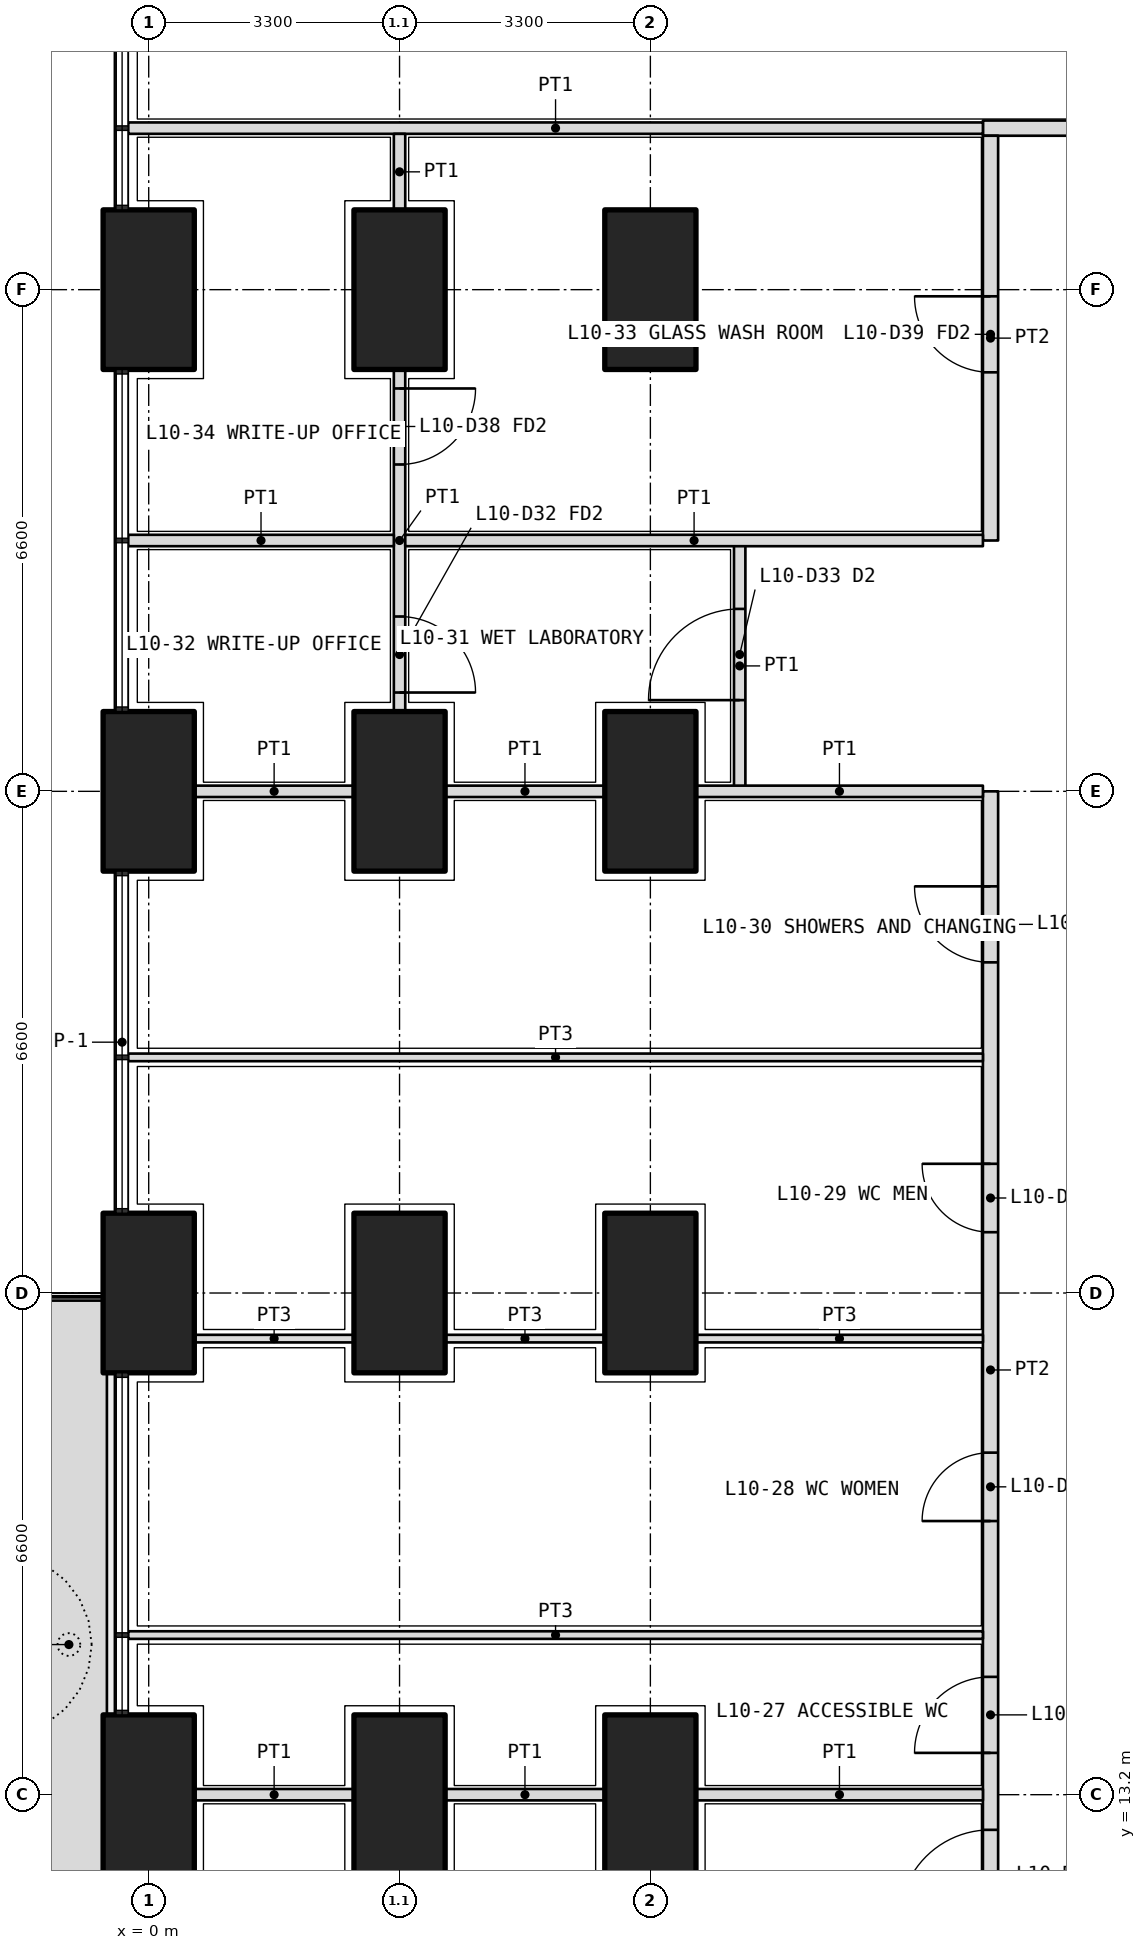
"""IFC4 building model, lengths in metres.
Left out: names, types, materials, properties, quantities, classifications, styles, units other than length and angle.
Written with IfcOpenShell. Run it as: python <this file> out.ifc"""

import sys

from ifc_helpers import new_model, si_unit, direction, frame, frame_2d, origin, origin_2d, place, context, subcontext, project, spatial, polyline, rectangle, outline, extrude, element, fill, save


model = new_model("IFC4")
c1 = context("Model", 3, precision=1e-05, world=origin(), true_north=direction((0.0, 1.0)))
c2 = subcontext(c1, "Body", "Model", "MODEL_VIEW")
j1 = project(units=[si_unit("LENGTHUNIT", "METRE"), si_unit("PLANEANGLEUNIT", "RADIAN")], contexts=[c1])
p1 = place(None, origin())
s1 = spatial("IfcSite", under=j1, at=p1, CompositionType="ELEMENT")
p2 = place(p1, origin())
s2 = spatial("IfcBuilding", under=s1, at=p2, CompositionType="ELEMENT")
p3 = place(p2, frame((0.0, 0.0, 46.5)))
s3 = spatial("IfcBuildingStorey", under=s2, at=p3, CompositionType="ELEMENT", Elevation=46.5)
for number, where, z_axis, x_axis in (
    (1, (0.0, 13.2, 0.0), (0.0, 0.0, 1.0), (0.0, 1.0, 0.0)),
    (2, (0.0, 19.8, 0.0), (0.0, 0.0, 1.0), (0.0, 1.0, 0.0)),
    (3, (0.0, 26.4, 0.0), (0.0, 0.0, 1.0), (0.0, 1.0, 0.0)),
    (4, (0.0, 33.0, 0.0), (0.0, 0.0, 1.0), (0.0, 1.0, 0.0)),
    (5, (3.3, 13.2, 0.0), (0.0, 0.0, 1.0), (0.0, 1.0, 0.0)),
    (6, (3.3, 19.8, 0.0), (0.0, 0.0, 1.0), (0.0, 1.0, 0.0)),
    (7, (3.3, 26.4, 0.0), (0.0, 0.0, 1.0), (0.0, 1.0, 0.0)),
    (8, (3.3, 33.0, 0.0), (0.0, 0.0, 1.0), (0.0, 1.0, 0.0)),
    (9, (6.6, 13.2, 0.0), (0.0, 0.0, 1.0), (0.0, 1.0, 0.0)),
    (10, (6.6, 19.8, 0.0), (0.0, 0.0, 1.0), (0.0, 1.0, 0.0)),
    (11, (6.6, 26.4, 0.0), (0.0, 0.0, 1.0), (0.0, 1.0, 0.0)),
    (12, (6.6, 33.0, 0.0), (0.0, 0.0, 1.0), (0.0, 1.0, 0.0)),
):
    element("IfcColumn", number, at=place(p3, frame(where, z_axis=z_axis, x_axis=x_axis)), inside=s3, PredefinedType="COLUMN", context=c2, shape_type="SweptSolid", body=[
        extrude(rectangle(XDim=2.1, YDim=1.2, at=origin_2d()), origin(), (0.0, 0.0, 1.0), 4.2),
    ])
p4 = place(p3, origin())
e13 = element("IfcWall", 13, at=p4, inside=s3, PredefinedType="USERDEFINED", context=c2, shape_type="SweptSolid", body=[
    extrude(outline(polyline([(-1.55, 10.65), (-0.55, 10.65), (-0.55, 19.7), (-1.55, 19.7), (-1.55, 10.65)]), holes=[polyline([(-1.4, 10.8), (-0.7, 10.8), (-0.7, 19.55), (-1.4, 19.55), (-1.4, 10.8)])]), origin(), (0.0, 0.0, 1.0), 1.05),
])
p5 = place(p3, frame((10.975, 35.125, 0.0), z_axis=(0.0, 0.0, 1.0), x_axis=(1.0, 0.0, 0.0)))
e14 = element("IfcWall", 14, at=p5, inside=s3, PredefinedType="PARTITIONING", context=c2, shape_type="SweptSolid", body=[
    extrude(rectangle(XDim=30.85, YDim=0.2, at=frame_2d((15.425, 0.0))), origin(), (0.0, 0.0, 1.0), 2.85),
])
p6 = place(p5, frame((3.962, 0.0, 0.0)))
e15 = element("IfcOpeningElement", 15, at=p6, cuts=e14, PredefinedType="OPENING", context=c2, shape_type="SweptSolid", body=[
    extrude(rectangle(XDim=1.0, YDim=2.1, at=frame_2d((0.5, 1.05))), frame((0.0, 0.11, 0.0), z_axis=(0.0, -1.0, 0.0), x_axis=(1.0, 0.0, 0.0)), (0.0, 0.0, 1.0), 0.22),
])
p7 = place(p5, frame((16.475, 0.0, 0.0)))
e16 = element("IfcOpeningElement", 16, at=p7, cuts=e14, PredefinedType="OPENING", context=c2, shape_type="SweptSolid", body=[
    extrude(rectangle(XDim=1.2, YDim=2.1, at=frame_2d((0.6, 1.05))), frame((0.0, 0.11, 0.0), z_axis=(0.0, -1.0, 0.0), x_axis=(1.0, 0.0, 0.0)), (0.0, 0.0, 1.0), 0.22),
])
p8 = place(p5, frame((27.438, 0.0, 0.0)))
e17 = element("IfcOpeningElement", 17, at=p8, cuts=e14, PredefinedType="OPENING", context=c2, shape_type="SweptSolid", body=[
    extrude(rectangle(XDim=1.2, YDim=2.1, at=frame_2d((0.6, 1.05))), frame((0.0, 0.11, 0.0), z_axis=(0.0, -1.0, 0.0), x_axis=(1.0, 0.0, 0.0)), (0.0, 0.0, 1.0), 0.22),
])
p9 = place(p3, frame((11.075, 11.175, 0.0), z_axis=(0.0, 0.0, 1.0), x_axis=(0.0, 1.0, 0.0)))
e18 = element("IfcWall", 18, at=p9, inside=s3, PredefinedType="PARTITIONING", context=c2, shape_type="SweptSolid", body=[
    extrude(rectangle(XDim=15.225, YDim=0.2, at=frame_2d((7.612, 0.0))), origin(), (0.0, 0.0, 1.0), 2.85),
])
p10 = place(p9, frame((0.363, 0.0, 0.0)))
e19 = element("IfcOpeningElement", 19, at=p10, cuts=e18, PredefinedType="OPENING", context=c2, shape_type="SweptSolid", body=[
    extrude(rectangle(XDim=1.2, YDim=2.1, at=frame_2d((0.6, 1.05))), frame((0.0, 0.11, 0.0), z_axis=(0.0, -1.0, 0.0), x_axis=(1.0, 0.0, 0.0)), (0.0, 0.0, 1.0), 0.22),
])
p11 = place(p9, frame((2.575, 0.0, 0.0)))
e20 = element("IfcOpeningElement", 20, at=p11, cuts=e18, PredefinedType="OPENING", context=c2, shape_type="SweptSolid", body=[
    extrude(rectangle(XDim=1.0, YDim=2.1, at=frame_2d((0.5, 1.05))), frame((0.0, 0.11, 0.0), z_axis=(0.0, -1.0, 0.0), x_axis=(1.0, 0.0, 0.0)), (0.0, 0.0, 1.0), 0.22),
])
p12 = place(p9, frame((5.625, 0.0, 0.0)))
e21 = element("IfcOpeningElement", 21, at=p12, cuts=e18, PredefinedType="OPENING", context=c2, shape_type="SweptSolid", body=[
    extrude(rectangle(XDim=0.9, YDim=2.1, at=frame_2d((0.45, 1.05))), frame((0.0, 0.11, 0.0), z_axis=(0.0, -1.0, 0.0), x_axis=(1.0, 0.0, 0.0)), (0.0, 0.0, 1.0), 0.22),
])
p13 = place(p9, frame((9.425, 0.0, 0.0)))
e22 = element("IfcOpeningElement", 22, at=p13, cuts=e18, PredefinedType="OPENING", context=c2, shape_type="SweptSolid", body=[
    extrude(rectangle(XDim=0.9, YDim=2.1, at=frame_2d((0.45, 1.05))), frame((0.0, 0.11, 0.0), z_axis=(0.0, -1.0, 0.0), x_axis=(1.0, 0.0, 0.0)), (0.0, 0.0, 1.0), 0.22),
])
p14 = place(p9, frame((12.975, 0.0, 0.0)))
e23 = element("IfcOpeningElement", 23, at=p14, cuts=e18, PredefinedType="OPENING", context=c2, shape_type="SweptSolid", body=[
    extrude(rectangle(XDim=1.0, YDim=2.1, at=frame_2d((0.5, 1.05))), frame((0.0, 0.11, 0.0), z_axis=(0.0, -1.0, 0.0), x_axis=(1.0, 0.0, 0.0)), (0.0, 0.0, 1.0), 0.22),
])
p15 = place(p3, frame((11.075, 29.7, 0.0), z_axis=(0.0, 0.0, 1.0), x_axis=(0.0, 1.0, 0.0)))
e24 = element("IfcWall", 24, at=p15, inside=s3, PredefinedType="PARTITIONING", context=c2, shape_type="SweptSolid", body=[
    extrude(rectangle(XDim=5.325, YDim=0.2, at=frame_2d((2.663, 0.0))), origin(), (0.0, 0.0, 1.0), 2.85),
])
p16 = place(p15, frame((2.212, 0.0, 0.0)))
e25 = element("IfcOpeningElement", 25, at=p16, cuts=e24, PredefinedType="OPENING", context=c2, shape_type="SweptSolid", body=[
    extrude(rectangle(XDim=1.0, YDim=2.1, at=frame_2d((0.5, 1.05))), frame((0.0, 0.11, 0.0), z_axis=(0.0, -1.0, 0.0), x_axis=(1.0, 0.0, 0.0)), (0.0, 0.0, 1.0), 0.22),
])
p17 = place(p3, frame((-0.27, 35.125, 0.0), z_axis=(0.0, 0.0, 1.0), x_axis=(1.0, 0.0, 0.0)))
e26 = element("IfcWall", 26, at=p17, inside=s3, PredefinedType="PARTITIONING", context=c2, shape_type="SweptSolid", body=[
    extrude(rectangle(XDim=11.245, YDim=0.15, at=frame_2d((5.623, 0.0))), origin(), (0.0, 0.0, 1.0), 2.7),
])
p18 = place(p3, frame((3.3, 35.05, 0.0), z_axis=(0.0, 0.0, 1.0), x_axis=(0.0, -1.0, 0.0)))
e27 = element("IfcWall", 27, at=p18, inside=s3, PredefinedType="PARTITIONING", context=c2, shape_type="SweptSolid", body=[
    extrude(rectangle(XDim=1.0, YDim=0.15, at=frame_2d((0.5, 0.0))), origin(), (0.0, 0.0, 1.0), 3.9),
])
p19 = place(p3, frame((3.3, 31.95, 0.0), z_axis=(0.0, 0.0, 1.0), x_axis=(0.0, -1.0, 0.0)))
e28 = element("IfcWall", 28, at=p19, inside=s3, PredefinedType="PARTITIONING", context=c2, shape_type="SweptSolid", body=[
    extrude(rectangle(XDim=4.5, YDim=0.15, at=frame_2d((2.25, 0.0))), origin(), (0.0, 0.0, 1.0), 3.9),
])
p20 = place(p19, frame((3.25, 0.0, 0.0)))
e29 = element("IfcOpeningElement", 29, at=p20, cuts=e28, PredefinedType="OPENING", context=c2, shape_type="SweptSolid", body=[
    extrude(rectangle(XDim=1.0, YDim=2.1, at=frame_2d((0.5, 1.05))), frame((0.0, 0.085, 0.0), z_axis=(0.0, -1.0, 0.0), x_axis=(1.0, 0.0, 0.0)), (0.0, 0.0, 1.0), 0.17),
])
p21 = place(p19, frame((0.25, 0.0, 0.0)))
e30 = element("IfcOpeningElement", 30, at=p21, cuts=e28, PredefinedType="OPENING", context=c2, shape_type="SweptSolid", body=[
    extrude(rectangle(XDim=1.0, YDim=2.1, at=frame_2d((0.5, 1.05))), frame((0.0, 0.085, 0.0), z_axis=(0.0, -1.0, 0.0), x_axis=(1.0, 0.0, 0.0)), (0.0, 0.0, 1.0), 0.17),
])
p22 = place(p3, frame((-0.27, 15.3, 0.0), z_axis=(0.0, 0.0, 1.0), x_axis=(1.0, 0.0, 0.0)))
e31 = element("IfcWall", 31, at=p22, inside=s3, PredefinedType="PARTITIONING", context=c2, shape_type="SweptSolid", body=[
    extrude(rectangle(XDim=11.245, YDim=0.1, at=frame_2d((5.623, 0.0))), origin(), (0.0, 0.0, 1.0), 2.7),
])
p23 = place(p3, frame((0.6, 19.2, 0.0), z_axis=(0.0, 0.0, 1.0), x_axis=(1.0, 0.0, 0.0)))
e32 = element("IfcWall", 32, at=p23, inside=s3, PredefinedType="PARTITIONING", context=c2, shape_type="SweptSolid", body=[
    extrude(rectangle(XDim=2.1, YDim=0.1, at=frame_2d((1.05, 0.0))), origin(), (0.0, 0.0, 1.0), 2.85),
])
p24 = place(p3, frame((3.9, 19.2, 0.0), z_axis=(0.0, 0.0, 1.0), x_axis=(1.0, 0.0, 0.0)))
e33 = element("IfcWall", 33, at=p24, inside=s3, PredefinedType="PARTITIONING", context=c2, shape_type="SweptSolid", body=[
    extrude(rectangle(XDim=2.1, YDim=0.1, at=frame_2d((1.05, 0.0))), origin(), (0.0, 0.0, 1.0), 2.85),
])
p25 = place(p3, frame((7.2, 19.2, 0.0), z_axis=(0.0, 0.0, 1.0), x_axis=(1.0, 0.0, 0.0)))
e34 = element("IfcWall", 34, at=p25, inside=s3, PredefinedType="PARTITIONING", context=c2, shape_type="SweptSolid", body=[
    extrude(rectangle(XDim=3.775, YDim=0.1, at=frame_2d((1.888, 0.0))), origin(), (0.0, 0.0, 1.0), 2.85),
])
p26 = place(p3, frame((-0.27, 22.9, 0.0), z_axis=(0.0, 0.0, 1.0), x_axis=(1.0, 0.0, 0.0)))
e35 = element("IfcWall", 35, at=p26, inside=s3, PredefinedType="PARTITIONING", context=c2, shape_type="SweptSolid", body=[
    extrude(rectangle(XDim=11.245, YDim=0.1, at=frame_2d((5.623, 0.0))), origin(), (0.0, 0.0, 1.0), 2.7),
])
p27 = place(p3, frame((7.775, 26.4, 0.0), z_axis=(0.0, 0.0, 1.0), x_axis=(0.0, 1.0, 0.0)))
e36 = element("IfcWall", 36, at=p27, inside=s3, PredefinedType="PARTITIONING", context=c2, shape_type="SweptSolid", body=[
    extrude(rectangle(XDim=3.3, YDim=0.15, at=frame_2d((1.65, 0.0))), origin(), (0.0, 0.0, 1.0), 2.85),
])
p28 = place(p27, frame((1.2, 0.0, 0.0)))
e37 = element("IfcOpeningElement", 37, at=p28, cuts=e36, PredefinedType="OPENING", context=c2, shape_type="SweptSolid", body=[
    extrude(rectangle(XDim=1.2, YDim=2.1, at=frame_2d((0.6, 1.05))), frame((0.0, 0.085, 0.0), z_axis=(0.0, -1.0, 0.0), x_axis=(1.0, 0.0, 0.0)), (0.0, 0.0, 1.0), 0.17),
])
p29 = place(p3, frame((0.6, 13.2, 0.0), z_axis=(0.0, 0.0, 1.0), x_axis=(1.0, 0.0, 0.0)))
e38 = element("IfcWall", 38, at=p29, inside=s3, PredefinedType="PARTITIONING", context=c2, shape_type="SweptSolid", body=[
    extrude(rectangle(XDim=2.1, YDim=0.15, at=frame_2d((1.05, 0.0))), origin(), (0.0, 0.0, 1.0), 2.85),
])
p30 = place(p3, frame((3.9, 13.2, 0.0), z_axis=(0.0, 0.0, 1.0), x_axis=(1.0, 0.0, 0.0)))
e39 = element("IfcWall", 39, at=p30, inside=s3, PredefinedType="PARTITIONING", context=c2, shape_type="SweptSolid", body=[
    extrude(rectangle(XDim=2.1, YDim=0.15, at=frame_2d((1.05, 0.0))), origin(), (0.0, 0.0, 1.0), 2.85),
])
p31 = place(p3, frame((7.2, 13.2, 0.0), z_axis=(0.0, 0.0, 1.0), x_axis=(1.0, 0.0, 0.0)))
e40 = element("IfcWall", 40, at=p31, inside=s3, PredefinedType="PARTITIONING", context=c2, shape_type="SweptSolid", body=[
    extrude(rectangle(XDim=3.775, YDim=0.15, at=frame_2d((1.888, 0.0))), origin(), (0.0, 0.0, 1.0), 2.85),
])
p32 = place(p3, frame((0.6, 26.4, 0.0), z_axis=(0.0, 0.0, 1.0), x_axis=(1.0, 0.0, 0.0)))
e41 = element("IfcWall", 41, at=p32, inside=s3, PredefinedType="PARTITIONING", context=c2, shape_type="SweptSolid", body=[
    extrude(rectangle(XDim=2.1, YDim=0.15, at=frame_2d((1.05, 0.0))), origin(), (0.0, 0.0, 1.0), 2.85),
])
p33 = place(p3, frame((3.9, 26.4, 0.0), z_axis=(0.0, 0.0, 1.0), x_axis=(1.0, 0.0, 0.0)))
e42 = element("IfcWall", 42, at=p33, inside=s3, PredefinedType="PARTITIONING", context=c2, shape_type="SweptSolid", body=[
    extrude(rectangle(XDim=2.1, YDim=0.15, at=frame_2d((1.05, 0.0))), origin(), (0.0, 0.0, 1.0), 2.85),
])
p34 = place(p3, frame((7.2, 26.4, 0.0), z_axis=(0.0, 0.0, 1.0), x_axis=(1.0, 0.0, 0.0)))
e43 = element("IfcWall", 43, at=p34, inside=s3, PredefinedType="PARTITIONING", context=c2, shape_type="SweptSolid", body=[
    extrude(rectangle(XDim=3.775, YDim=0.15, at=frame_2d((1.888, 0.0))), origin(), (0.0, 0.0, 1.0), 2.85),
])
p35 = place(p3, frame((-0.27, 29.7, 0.0), z_axis=(0.0, 0.0, 1.0), x_axis=(1.0, 0.0, 0.0)))
e44 = element("IfcWall", 44, at=p35, inside=s3, PredefinedType="PARTITIONING", context=c2, shape_type="SweptSolid", body=[
    extrude(rectangle(XDim=3.495, YDim=0.15, at=frame_2d((1.748, 0.0))), origin(), (0.0, 0.0, 1.0), 2.7),
])
p36 = place(p3, frame((3.375, 29.7, 0.0), z_axis=(0.0, 0.0, 1.0), x_axis=(1.0, 0.0, 0.0)))
e45 = element("IfcWall", 45, at=p36, inside=s3, PredefinedType="PARTITIONING", context=c2, shape_type="SweptSolid", body=[
    extrude(rectangle(XDim=7.6, YDim=0.15, at=frame_2d((3.8, 0.0))), origin(), (0.0, 0.0, 1.0), 3.9),
])
p37 = place(p10, origin())
e46 = element("IfcDoor", 46, at=p37, inside=s3, OperationType="DOUBLE_DOOR_SINGLE_SWING", PredefinedType="DOOR", context=c2, shape_type="SweptSolid", body=[
    extrude(rectangle(XDim=1.2, YDim=2.1, at=frame_2d((0.6, 1.05))), frame((0.0, 0.025, 0.0), z_axis=(0.0, -1.0, 0.0), x_axis=(1.0, 0.0, 0.0)), (0.0, 0.0, 1.0), 0.05),
])
fill(e19, e46)
p38 = place(p11, origin())
e47 = element("IfcDoor", 47, at=p38, inside=s3, OperationType="SINGLE_SWING_LEFT", PredefinedType="DOOR", context=c2, shape_type="SweptSolid", body=[
    extrude(rectangle(XDim=1.0, YDim=2.1, at=frame_2d((0.5, 1.05))), frame((0.0, 0.025, 0.0), z_axis=(0.0, -1.0, 0.0), x_axis=(1.0, 0.0, 0.0)), (0.0, 0.0, 1.0), 0.05),
])
fill(e20, e47)
p39 = place(p12, origin())
e48 = element("IfcDoor", 48, at=p39, inside=s3, OperationType="SINGLE_SWING_LEFT", PredefinedType="DOOR", context=c2, shape_type="SweptSolid", body=[
    extrude(rectangle(XDim=0.9, YDim=2.1, at=frame_2d((0.45, 1.05))), frame((0.0, 0.025, 0.0), z_axis=(0.0, -1.0, 0.0), x_axis=(1.0, 0.0, 0.0)), (0.0, 0.0, 1.0), 0.05),
])
fill(e21, e48)
p40 = place(p13, origin())
e49 = element("IfcDoor", 49, at=p40, inside=s3, OperationType="SINGLE_SWING_RIGHT", PredefinedType="DOOR", context=c2, shape_type="SweptSolid", body=[
    extrude(rectangle(XDim=0.9, YDim=2.1, at=frame_2d((0.45, 1.05))), frame((0.0, 0.025, 0.0), z_axis=(0.0, -1.0, 0.0), x_axis=(1.0, 0.0, 0.0)), (0.0, 0.0, 1.0), 0.05),
])
fill(e22, e49)
p41 = place(p14, origin())
e50 = element("IfcDoor", 50, at=p41, inside=s3, OperationType="SINGLE_SWING_RIGHT", PredefinedType="DOOR", context=c2, shape_type="SweptSolid", body=[
    extrude(rectangle(XDim=1.0, YDim=2.1, at=frame_2d((0.5, 1.05))), frame((0.0, 0.025, 0.0), z_axis=(0.0, -1.0, 0.0), x_axis=(1.0, 0.0, 0.0)), (0.0, 0.0, 1.0), 0.05),
])
fill(e23, e50)
p42 = place(p28, origin())
e51 = element("IfcDoor", 51, at=p42, inside=s3, OperationType="DOUBLE_DOOR_SINGLE_SWING", PredefinedType="DOOR", context=c2, shape_type="SweptSolid", body=[
    extrude(rectangle(XDim=1.2, YDim=2.1, at=frame_2d((0.6, 1.05))), frame((0.0, 0.025, 0.0), z_axis=(0.0, -1.0, 0.0), x_axis=(1.0, 0.0, 0.0)), (0.0, 0.0, 1.0), 0.05),
])
fill(e37, e51)
p43 = place(p20, origin())
e52 = element("IfcDoor", 52, at=p43, inside=s3, OperationType="SINGLE_SWING_RIGHT", PredefinedType="DOOR", context=c2, shape_type="SweptSolid", body=[
    extrude(rectangle(XDim=1.0, YDim=2.1, at=frame_2d((0.5, 1.05))), frame((0.0, 0.025, 0.0), z_axis=(0.0, -1.0, 0.0), x_axis=(1.0, 0.0, 0.0)), (0.0, 0.0, 1.0), 0.05),
])
fill(e29, e52)
p44 = place(p16, origin())
e53 = element("IfcDoor", 53, at=p44, inside=s3, OperationType="SINGLE_SWING_RIGHT", PredefinedType="DOOR", context=c2, shape_type="SweptSolid", body=[
    extrude(rectangle(XDim=1.0, YDim=2.1, at=frame_2d((0.5, 1.05))), frame((0.0, 0.025, 0.0), z_axis=(0.0, -1.0, 0.0), x_axis=(1.0, 0.0, 0.0)), (0.0, 0.0, 1.0), 0.05),
])
fill(e25, e53)
p45 = place(p21, origin())
e54 = element("IfcDoor", 54, at=p45, inside=s3, OperationType="SINGLE_SWING_LEFT", PredefinedType="DOOR", context=c2, shape_type="SweptSolid", body=[
    extrude(rectangle(XDim=1.0, YDim=2.1, at=frame_2d((0.5, 1.05))), frame((0.0, 0.025, 0.0), z_axis=(0.0, -1.0, 0.0), x_axis=(1.0, 0.0, 0.0)), (0.0, 0.0, 1.0), 0.05),
])
fill(e30, e54)
save(model, sys.argv[1])
